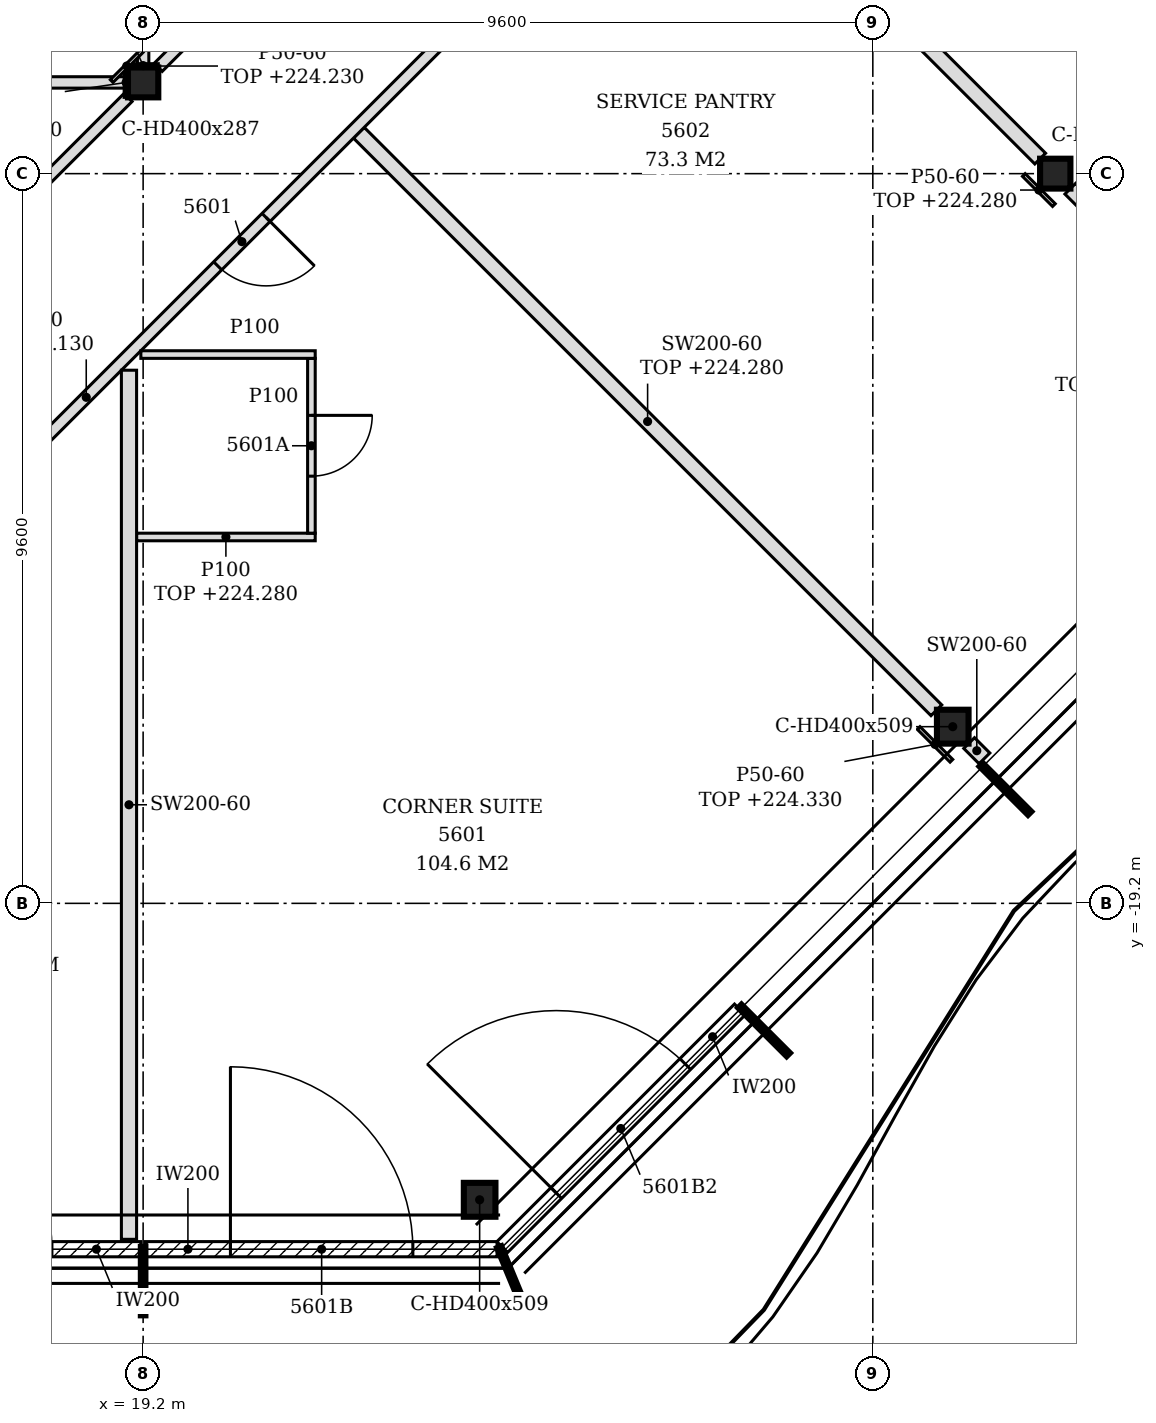
"""IFC4 building model, lengths in metres.
Left out: names, types, materials, properties, quantities, classifications, styles, units other than length and angle.
Written with IfcOpenShell. Run it as: python <this file> out.ifc"""

import sys

from ifc_helpers import new_model, si_unit, direction, frame, frame_2d, origin, origin_2d, place, context, subcontext, project, spatial, polyline, rectangle, i_section, outline, extrude, element, fill, save


model = new_model("IFC4")
c1 = context("Model", 3, precision=1e-05, world=origin(), true_north=direction((0.0, 1.0)))
c2 = subcontext(c1, "Body", "Model", "MODEL_VIEW")
j1 = project(units=[si_unit("LENGTHUNIT", "METRE"), si_unit("PLANEANGLEUNIT", "RADIAN")], contexts=[c1])
p1 = place(None, origin())
s1 = spatial("IfcSite", under=j1, at=p1, CompositionType="ELEMENT")
p2 = place(p1, origin())
s2 = spatial("IfcBuilding", under=s1, at=p2, CompositionType="ELEMENT")
p3 = place(p2, frame((0.0, 0.0, 221.4)))
s3 = spatial("IfcBuildingStorey", under=s2, at=p3, CompositionType="ELEMENT", Elevation=221.4)
for number, where, z_axis, x_axis in (
    (1, (23.627, -23.1, -0.15), (0.0, 0.0, 1.0), (1.0, 0.0, 0.0)),
    (2, (29.852, -16.876, -0.15), (0.0, 0.0, 1.0), (1.0, 0.0, 0.0)),
):
    element("IfcColumn", number, at=place(p3, frame(where, z_axis=z_axis, x_axis=x_axis)), inside=s3, PredefinedType="COLUMN", context=c2, shape_type="SweptSolid", body=[
        extrude(i_section(OverallWidth=0.416, OverallDepth=0.446, WebThickness=0.039, FlangeThickness=0.063, FilletRadius=0.015, at=origin_2d()), origin(), (0.0, 0.0, 1.0), 3.6),
    ])
for number, where, z_axis, x_axis in (
    (3, (19.2, -8.4, -0.15), (0.0, 0.0, 1.0), (1.0, 0.0, 0.0)),
    (4, (31.2, -9.6, -0.15), (0.0, 0.0, 1.0), (1.0, 0.0, 0.0)),
):
    element("IfcColumn", number, at=place(p3, frame(where, z_axis=z_axis, x_axis=x_axis)), inside=s3, PredefinedType="COLUMN", context=c2, shape_type="SweptSolid", body=[
        extrude(i_section(OverallWidth=0.399, OverallDepth=0.393, WebThickness=0.023, FlangeThickness=0.037, FilletRadius=0.015, at=origin_2d()), origin(), (0.0, 0.0, 1.0), 3.6),
    ])
p4 = place(p3, frame((14.43, -23.75, 0.0), z_axis=(0.0, 0.0, 1.0), x_axis=(1.0, 0.0, 0.0)))
e5 = element("IfcWall", 5, at=p4, inside=s3, PredefinedType="NOTDEFINED", context=c2, shape_type="SweptSolid", body=[
    extrude(rectangle(XDim=4.74, YDim=0.2, at=frame_2d((2.37, 0.0))), origin(), (0.0, 0.0, 1.0), 3.45),
])
p5 = place(p4, frame((1.17, 0.0, 0.0)))
e6 = element("IfcOpeningElement", 6, at=p5, cuts=e5, PredefinedType="OPENING", context=c2, shape_type="SweptSolid", body=[
    extrude(rectangle(XDim=2.4, YDim=2.4, at=frame_2d((1.2, 1.2))), frame((0.0, 0.11, 0.0), z_axis=(0.0, -1.0, 0.0), x_axis=(1.0, 0.0, 0.0)), (0.0, 0.0, 1.0), 0.22),
])
p6 = place(p3, frame((19.23, -23.75, 0.0), z_axis=(0.0, 0.0, 1.0), x_axis=(1.0, 0.0, 0.0)))
e7 = element("IfcWall", 7, at=p6, inside=s3, PredefinedType="NOTDEFINED", context=c2, shape_type="SweptSolid", body=[
    extrude(rectangle(XDim=4.626, YDim=0.2, at=frame_2d((2.313, 0.0))), origin(), (0.0, 0.0, 1.0), 3.45),
])
p7 = place(p6, frame((1.119, 0.0, 0.0)))
e8 = element("IfcOpeningElement", 8, at=p7, cuts=e7, PredefinedType="OPENING", context=c2, shape_type="SweptSolid", body=[
    extrude(rectangle(XDim=2.4, YDim=2.4, at=frame_2d((1.2, 1.2))), frame((0.0, 0.11, 0.0), z_axis=(0.0, -1.0, 0.0), x_axis=(1.0, 0.0, 0.0)), (0.0, 0.0, 1.0), 0.22),
])
p8 = place(p3, frame((23.925, -23.722, 0.0), z_axis=(0.0, 0.0, 1.0), x_axis=(0.707106781187, 0.707106781187, 0.0)))
e9 = element("IfcWall", 9, at=p8, inside=s3, PredefinedType="NOTDEFINED", context=c2, shape_type="SweptSolid", body=[
    extrude(rectangle(XDim=4.421, YDim=0.2, at=frame_2d((2.21, 0.0))), origin(), (0.0, 0.0, 1.0), 3.45),
])
p9 = place(p8, frame((1.005, 0.0, 0.0)))
e10 = element("IfcOpeningElement", 10, at=p9, cuts=e9, PredefinedType="OPENING", context=c2, shape_type="SweptSolid", body=[
    extrude(rectangle(XDim=2.4, YDim=2.4, at=frame_2d((1.2, 1.2))), frame((0.0, 0.11, 0.0), z_axis=(0.0, -1.0, 0.0), x_axis=(1.0, 0.0, 0.0)), (0.0, 0.0, 1.0), 0.22),
])
p10 = place(p3, frame((19.014, -23.62, 0.0), z_axis=(0.0, 0.0, 1.0), x_axis=(0.0, 1.0, 0.0)))
e11 = element("IfcWall", 11, at=p10, inside=s3, PredefinedType="PARTITIONING", context=c2, shape_type="SweptSolid", body=[
    extrude(outline(polyline([(0.0, 0.0), (11.434, 0.0), (11.434, 2.73), (0.64, 2.73), (0.638, 2.93), (0.37, 2.93), (0.368, 3.45), (0.0, 3.45), (0.0, 0.0)])), frame((0.0, 0.1, 0.0), z_axis=(0.0, -1.0, 0.0), x_axis=(1.0, 0.0, 0.0)), (0.0, 0.0, 1.0), 0.2),
])
p11 = place(p3, frame((30.269, -17.293, 0.0), z_axis=(0.0, 0.0, 1.0), x_axis=(-0.707106781187, 0.707106781187, 0.0)))
e12 = element("IfcWall", 12, at=p11, inside=s3, PredefinedType="PARTITIONING", context=c2, shape_type="SweptSolid", body=[
    extrude(rectangle(XDim=0.285, YDim=0.2, at=frame_2d((0.143, 0.0))), origin(), (0.0, 0.0, 1.0), 3.45),
])
p12 = place(p3, frame((29.636, -16.66, 0.0), z_axis=(0.0, 0.0, 1.0), x_axis=(-0.707095420673, 0.707118141518, 0.0)))
e13 = element("IfcWall", 13, at=p12, inside=s3, PredefinedType="PARTITIONING", context=c2, shape_type="SweptSolid", body=[
    extrude(rectangle(XDim=10.745, YDim=0.2, at=frame_2d((5.373, 0.0))), origin(), (0.0, 0.0, 1.0), 2.88),
])
p13 = place(p3, frame((19.114, -14.38, 0.0), z_axis=(0.0, 0.0, 1.0), x_axis=(1.0, 0.0, 0.0)))
e14 = element("IfcWall", 14, at=p13, inside=s3, PredefinedType="PARTITIONING", context=c2, shape_type="SweptSolid", body=[
    extrude(outline(polyline([(0.0, 0.0), (2.35, 0.0), (2.35, 2.88), (0.236, 2.88), (0.234, 2.73), (0.0, 2.73), (0.0, 0.0)])), frame((0.0, 0.05, 0.0), z_axis=(0.0, -1.0, 0.0), x_axis=(1.0, 0.0, 0.0)), (0.0, 0.0, 1.0), 0.1),
])
p14 = place(p3, frame((16.722, -14.272, 0.0), z_axis=(0.0, 0.0, 1.0), x_axis=(0.707106781187, 0.707106781187, 0.0)))
e15 = element("IfcWall", 15, at=p14, inside=s3, PredefinedType="PARTITIONING", context=c2, shape_type="SweptSolid", body=[
    extrude(rectangle(XDim=20.049, YDim=0.15, at=frame_2d((10.025, 0.0))), origin(), (0.0, 0.0, 1.0), 2.73),
])
p15 = place(p14, frame((4.892, 0.0, 0.0)))
e16 = element("IfcOpeningElement", 16, at=p15, cuts=e15, PredefinedType="OPENING", context=c2, shape_type="SweptSolid", body=[
    extrude(rectangle(XDim=0.9, YDim=2.1, at=frame_2d((0.45, 1.05))), frame((0.0, 0.085, 0.0), z_axis=(0.0, -1.0, 0.0), x_axis=(1.0, 0.0, 0.0)), (0.0, 0.0, 1.0), 0.17),
])
p16 = place(p14, frame((10.042, 0.0, 0.0)))
e17 = element("IfcOpeningElement", 17, at=p16, cuts=e15, PredefinedType="OPENING", context=c2, shape_type="SweptSolid", body=[
    extrude(rectangle(XDim=0.9, YDim=2.1, at=frame_2d((0.45, 1.05))), frame((0.0, 0.085, 0.0), z_axis=(0.0, -1.0, 0.0), x_axis=(1.0, 0.0, 0.0)), (0.0, 0.0, 1.0), 0.17),
])
p17 = place(p14, frame((14.443, 0.0, 0.0)))
e18 = element("IfcOpeningElement", 18, at=p17, cuts=e15, PredefinedType="OPENING", context=c2, shape_type="SweptSolid", body=[
    extrude(rectangle(XDim=0.9, YDim=2.1, at=frame_2d((0.45, 1.05))), frame((0.0, 0.085, 0.0), z_axis=(0.0, -1.0, 0.0), x_axis=(1.0, 0.0, 0.0)), (0.0, 0.0, 1.0), 0.17),
])
p18 = place(p14, frame((17.837, 0.0, 0.0)))
e19 = element("IfcOpeningElement", 19, at=p18, cuts=e15, PredefinedType="OPENING", context=c2, shape_type="SweptSolid", body=[
    extrude(rectangle(XDim=0.9, YDim=2.1, at=frame_2d((0.45, 1.05))), frame((0.0, 0.085, 0.0), z_axis=(0.0, -1.0, 0.0), x_axis=(1.0, 0.0, 0.0)), (0.0, 0.0, 1.0), 0.17),
])
p19 = place(p3, frame((21.414, -14.33, 0.0), z_axis=(0.0, 0.0, 1.0), x_axis=(0.0, 1.0, 0.0)))
e20 = element("IfcWall", 20, at=p19, inside=s3, PredefinedType="PARTITIONING", context=c2, shape_type="SweptSolid", body=[
    extrude(outline(polyline([(0.0, 0.0), (2.3, 0.0), (2.3, 3.45), (0.035, 3.45), (0.033, 2.88), (0.0, 2.88), (0.0, 0.0)])), frame((0.0, 0.05, 0.0), z_axis=(0.0, -1.0, 0.0), x_axis=(1.0, 0.0, 0.0)), (0.0, 0.0, 1.0), 0.1),
])
p20 = place(p19, frame((0.75, 0.0, 0.0)))
e21 = element("IfcOpeningElement", 21, at=p20, cuts=e20, PredefinedType="OPENING", context=c2, shape_type="SweptSolid", body=[
    extrude(rectangle(XDim=0.8, YDim=2.1, at=frame_2d((0.4, 1.05))), frame((0.0, 0.06, 0.0), z_axis=(0.0, -1.0, 0.0), x_axis=(1.0, 0.0, 0.0)), (0.0, 0.0, 1.0), 0.12),
])
p21 = place(p3, frame((34.581, -12.981, 0.0), z_axis=(0.0, 0.0, 1.0), x_axis=(-0.707133900936, 0.707079660397, 0.0)))
e22 = element("IfcWall", 22, at=p21, inside=s3, PredefinedType="PARTITIONING", context=c2, shape_type="SweptSolid", body=[
    extrude(rectangle(XDim=4.501, YDim=0.2, at=frame_2d((2.25, 0.0))), origin(), (0.0, 0.0, 1.0), 2.63),
])
p22 = place(p3, frame((19.17, -11.98, 0.0), z_axis=(0.0, 0.0, 1.0), x_axis=(1.0, 0.0, 0.0)))
e23 = element("IfcWall", 23, at=p22, inside=s3, PredefinedType="PARTITIONING", context=c2, shape_type="SweptSolid", body=[
    extrude(outline(polyline([(0.0, 0.0), (2.294, 0.0), (2.294, 3.45), (0.18, 3.45), (0.178, 2.73), (0.0, 2.73), (0.0, 0.0)])), frame((0.0, 0.05, 0.0), z_axis=(0.0, -1.0, 0.0), x_axis=(1.0, 0.0, 0.0)), (0.0, 0.0, 1.0), 0.1),
])
p23 = place(p3, frame((15.728, -11.872, 0.0), z_axis=(0.0, 0.0, 1.0), x_axis=(0.707080416772, 0.707133144618, 0.0)))
e24 = element("IfcWall", 24, at=p23, inside=s3, PredefinedType="PARTITIONING", context=c2, shape_type="SweptSolid", body=[
    extrude(rectangle(XDim=4.63, YDim=0.15, at=frame_2d((2.315, 0.0))), origin(), (0.0, 0.0, 1.0), 3.45),
])
p24 = place(p3, frame((35.86, -10.436, 0.0), z_axis=(0.0, 0.0, 1.0), x_axis=(-0.707106781187, 0.707106781187, 0.0)))
e25 = element("IfcWall", 25, at=p24, inside=s3, PredefinedType="PARTITIONING", context=c2, shape_type="SweptSolid", body=[
    extrude(rectangle(XDim=10.745, YDim=0.2, at=frame_2d((5.373, 0.0))), origin(), (0.0, 0.0, 1.0), 2.88),
])
p25 = place(p3, frame((31.002, -9.402, 0.0), z_axis=(0.0, 0.0, 1.0), x_axis=(-0.707088226093, 0.707125335793, 0.0)))
e26 = element("IfcWall", 26, at=p25, inside=s3, PredefinedType="PARTITIONING", context=c2, shape_type="SweptSolid", body=[
    extrude(rectangle(XDim=6.579, YDim=0.2, at=frame_2d((3.29, 0.0))), origin(), (0.0, 0.0, 1.0), 2.88),
])
p26 = place(p3, frame((7.399, -8.4, 0.0), z_axis=(0.0, 0.0, 1.0), x_axis=(1.0, 0.0, 0.0)))
e27 = element("IfcWall", 27, at=p26, inside=s3, PredefinedType="PARTITIONING", context=c2, shape_type="SweptSolid", body=[
    extrude(rectangle(XDim=11.601, YDim=0.15, at=frame_2d((5.801, 0.0))), origin(), (0.0, 0.0, 1.0), 2.83),
])
p27 = place(p26, frame((5.351, 0.0, 0.0)))
e28 = element("IfcOpeningElement", 28, at=p27, cuts=e27, PredefinedType="OPENING", context=c2, shape_type="SweptSolid", body=[
    extrude(rectangle(XDim=0.9, YDim=2.1, at=frame_2d((0.45, 1.05))), frame((0.0, 0.085, 0.0), z_axis=(0.0, -1.0, 0.0), x_axis=(1.0, 0.0, 0.0)), (0.0, 0.0, 1.0), 0.17),
])
p28 = place(p3, frame((19.2, -8.204, 0.0), z_axis=(0.0, 0.0, 1.0), x_axis=(0.0, 1.0, 0.0)))
e29 = element("IfcWall", 29, at=p28, inside=s3, PredefinedType="PARTITIONING", context=c2, shape_type="SweptSolid", body=[
    extrude(rectangle(XDim=9.329, YDim=0.15, at=frame_2d((4.664, 0.0))), origin(), (0.0, 0.0, 1.0), 2.83),
])
p29 = place(p28, frame((7.354, 0.0, 0.0)))
e30 = element("IfcOpeningElement", 30, at=p29, cuts=e29, PredefinedType="OPENING", context=c2, shape_type="SweptSolid", body=[
    extrude(rectangle(XDim=0.8, YDim=2.1, at=frame_2d((0.4, 1.05))), frame((0.0, 0.085, 0.0), z_axis=(0.0, -1.0, 0.0), x_axis=(1.0, 0.0, 0.0)), (0.0, 0.0, 1.0), 0.17),
])
p30 = place(p28, frame((4.503, 0.0, 0.0)))
e31 = element("IfcOpeningElement", 31, at=p30, cuts=e29, PredefinedType="OPENING", context=c2, shape_type="SweptSolid", body=[
    extrude(rectangle(XDim=0.8, YDim=2.1, at=frame_2d((0.4, 1.05))), frame((0.0, 0.085, 0.0), z_axis=(0.0, -1.0, 0.0), x_axis=(1.0, 0.0, 0.0)), (0.0, 0.0, 1.0), 0.17),
])
p31 = place(p3, frame((19.398, -8.202, 0.0), z_axis=(0.0, 0.0, 1.0), x_axis=(0.707116088468, 0.707097473782, 0.0)))
e32 = element("IfcWall", 32, at=p31, inside=s3, PredefinedType="PARTITIONING", context=c2, shape_type="SweptSolid", body=[
    extrude(rectangle(XDim=13.115, YDim=0.15, at=frame_2d((6.558, 0.0))), origin(), (0.0, 0.0, 1.0), 2.88),
])
p32 = place(p31, frame((6.058, 0.0, 0.0)))
e33 = element("IfcOpeningElement", 33, at=p32, cuts=e32, PredefinedType="OPENING", context=c2, shape_type="SweptSolid", body=[
    extrude(rectangle(XDim=0.9, YDim=2.1, at=frame_2d((0.45, 1.05))), frame((0.0, 0.085, 0.0), z_axis=(0.0, -1.0, 0.0), x_axis=(1.0, 0.0, 0.0)), (0.0, 0.0, 1.0), 0.17),
])
p33 = place(p3, frame((39.331, -8.131, 0.0), z_axis=(0.0, 0.0, 1.0), x_axis=(-0.707106781187, 0.707106781187, 0.0)))
e34 = element("IfcWall", 34, at=p33, inside=s3, PredefinedType="PARTITIONING", context=c2, shape_type="SweptSolid", body=[
    extrude(rectangle(XDim=11.219, YDim=0.2, at=frame_2d((5.61, 0.0))), origin(), (0.0, 0.0, 1.0), 2.93),
])
p34 = place(p3, frame((29.834, -17.324, 0.0), z_axis=(0.0, 0.0, 1.0), x_axis=(-0.706906496032, 0.707307009627, 0.0)))
e35 = element("IfcWall", 35, at=p34, inside=s3, PredefinedType="PARTITIONING", context=c2, shape_type="SweptSolid", body=[
    extrude(rectangle(XDim=0.61, YDim=0.05, at=frame_2d((0.305, 0.0))), origin(), (0.0, 0.0, 1.0), 2.93),
])
p35 = place(p3, frame((31.182, -10.014, 0.0), z_axis=(0.0, 0.0, 1.0), x_axis=(-0.707106781187, 0.707106781187, 0.0)))
e36 = element("IfcWall", 36, at=p35, inside=s3, PredefinedType="PARTITIONING", context=c2, shape_type="SweptSolid", body=[
    extrude(rectangle(XDim=0.56, YDim=0.05, at=frame_2d((0.28, 0.0))), origin(), (0.0, 0.0, 1.0), 2.88),
])
p36 = place(p3, frame((18.786, -8.382, 0.0), z_axis=(0.0, 0.0, 1.0), x_axis=(0.707106781187, 0.707106781187, 0.0)))
e37 = element("IfcWall", 37, at=p36, inside=s3, PredefinedType="PARTITIONING", context=c2, shape_type="SweptSolid", body=[
    extrude(rectangle(XDim=0.56, YDim=0.05, at=frame_2d((0.28, 0.0))), origin(), (0.0, 0.0, 1.0), 2.83),
])
p37 = place(p3, frame((19.0, -8.178, 0.0), z_axis=(0.0, 0.0, 1.0), x_axis=(1.0, 0.0, 0.0)))
e38 = element("IfcWall", 38, at=p37, inside=s3, PredefinedType="PARTITIONING", context=c2, shape_type="SweptSolid", body=[
    extrude(rectangle(XDim=0.399, YDim=0.05, at=frame_2d((0.199, 0.0))), origin(), (0.0, 0.0, 1.0), 2.83),
])
p38 = place(p3, frame((18.976, -8.596, 0.0), z_axis=(0.0, 0.0, 1.0), x_axis=(0.0, 1.0, 0.0)))
e39 = element("IfcWall", 39, at=p38, inside=s3, PredefinedType="PARTITIONING", context=c2, shape_type="SweptSolid", body=[
    extrude(rectangle(XDim=0.393, YDim=0.05, at=frame_2d((0.196, 0.0))), origin(), (0.0, 0.0, 1.0), 2.83),
])
p39 = place(p7, origin())
e40 = element("IfcDoor", 40, at=p39, inside=s3, OperationType="SINGLE_SWING_LEFT", PredefinedType="DOOR", context=c2, shape_type="SweptSolid", body=[
    extrude(rectangle(XDim=2.4, YDim=2.4, at=frame_2d((1.2, 1.2))), frame((0.0, 0.025, 0.0), z_axis=(0.0, -1.0, 0.0), x_axis=(1.0, 0.0, 0.0)), (0.0, 0.0, 1.0), 0.05),
])
fill(e8, e40)
p40 = place(p9, origin())
e41 = element("IfcDoor", 41, at=p40, inside=s3, OperationType="SINGLE_SWING_LEFT", PredefinedType="DOOR", context=c2, shape_type="SweptSolid", body=[
    extrude(rectangle(XDim=2.4, YDim=2.4, at=frame_2d((1.2, 1.2))), frame((0.0, 0.025, 0.0), z_axis=(0.0, -1.0, 0.0), x_axis=(1.0, 0.0, 0.0)), (0.0, 0.0, 1.0), 0.05),
])
fill(e10, e41)
p41 = place(p15, frame((0.9, 0.0, 0.0), z_axis=(0.0, 0.0, 1.0), x_axis=(-1.0, 0.0, 0.0)))
e42 = element("IfcDoor", 42, at=p41, inside=s3, OperationType="SINGLE_SWING_LEFT", PredefinedType="DOOR", context=c2, shape_type="SweptSolid", body=[
    extrude(rectangle(XDim=0.9, YDim=2.1, at=frame_2d((0.45, 1.05))), frame((0.0, 0.025, 0.0), z_axis=(0.0, -1.0, 0.0), x_axis=(1.0, 0.0, 0.0)), (0.0, 0.0, 1.0), 0.05),
])
fill(e16, e42)
p42 = place(p20, frame((0.8, 0.0, 0.0), z_axis=(0.0, 0.0, 1.0), x_axis=(-1.0, 0.0, 0.0)))
e43 = element("IfcDoor", 43, at=p42, inside=s3, OperationType="SINGLE_SWING_LEFT", PredefinedType="DOOR", context=c2, shape_type="SweptSolid", body=[
    extrude(rectangle(XDim=0.8, YDim=2.1, at=frame_2d((0.4, 1.05))), frame((0.0, 0.025, 0.0), z_axis=(0.0, -1.0, 0.0), x_axis=(1.0, 0.0, 0.0)), (0.0, 0.0, 1.0), 0.05),
])
fill(e21, e43)
save(model, sys.argv[1])
